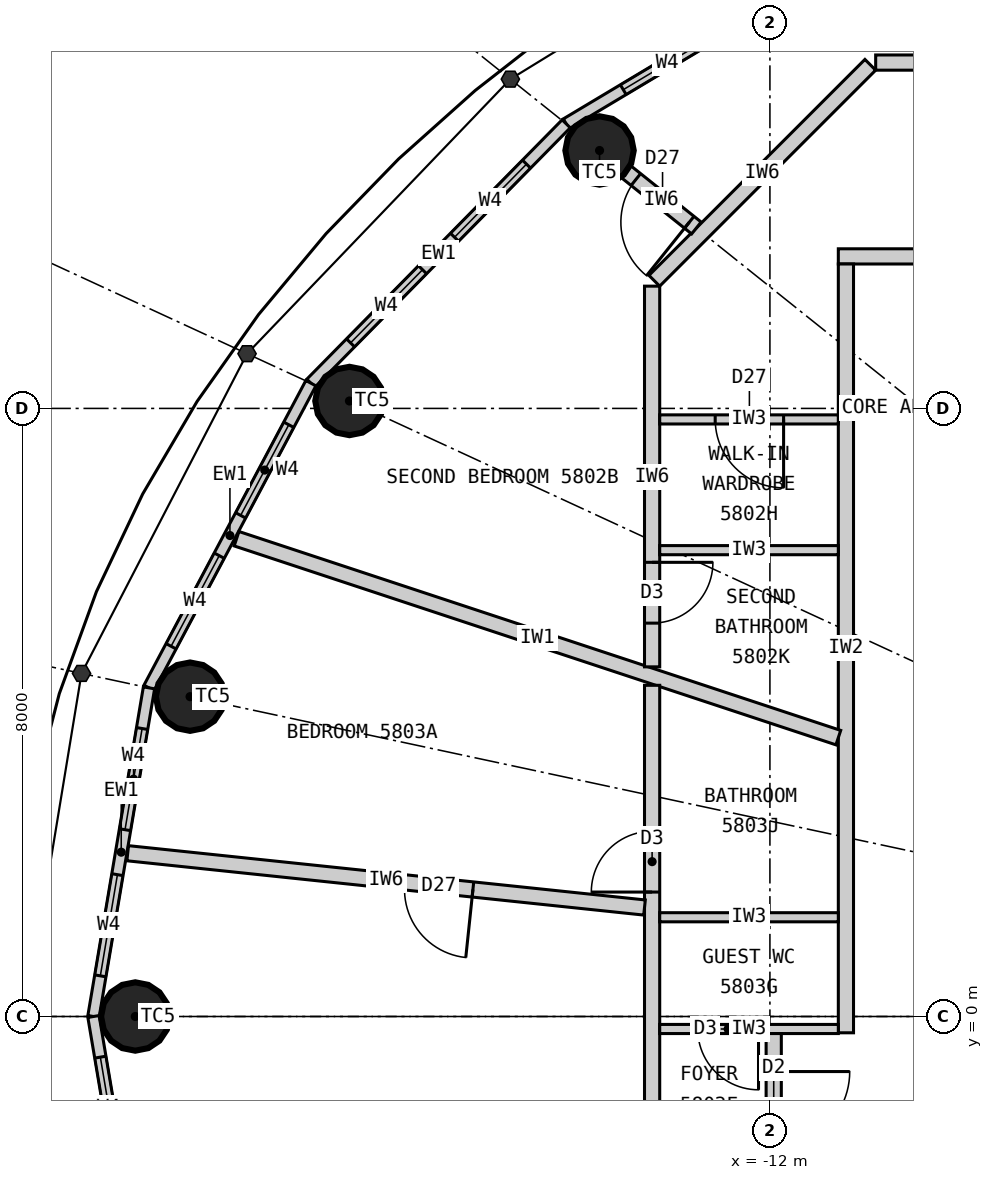
"""IFC4 building model, lengths in metres.
Left out: names, types, materials, properties, quantities, classifications, styles, units other than length and angle.
Written with IfcOpenShell. Run it as: python <this file> out.ifc"""

import sys

from ifc_helpers import new_model, si_unit, direction, frame, frame_2d, origin, origin_2d, place, context, subcontext, project, spatial, rectangle, circle, extrude, element, fill, save


model = new_model("IFC4")
c1 = context("Model", 3, precision=1e-05, world=origin(), true_north=direction((0.0, 1.0)))
c2 = subcontext(c1, "Body", "Model", "MODEL_VIEW")
j1 = project(units=[si_unit("LENGTHUNIT", "METRE"), si_unit("PLANEANGLEUNIT", "RADIAN")], contexts=[c1])
p1 = place(None, origin())
s1 = spatial("IfcSite", under=j1, at=p1, CompositionType="ELEMENT")
p2 = place(p1, origin())
s2 = spatial("IfcBuilding", under=s1, at=p2, CompositionType="ELEMENT")
p3 = place(p2, frame((0.0, 0.0, 216.0)))
s3 = spatial("IfcBuildingStorey", under=s2, at=p3, CompositionType="ELEMENT", Elevation=216.0)
for number, where, z_axis, x_axis in (
    (1, (-14.241, 11.393, 0.0), (0.0, 0.0, 1.0), (1.0, 0.0, 0.0)),
    (2, (-17.532, 8.098, 0.0), (0.0, 0.0, 1.0), (1.0, 0.0, 0.0)),
    (3, (-19.629, 4.208, 0.0), (0.0, 0.0, 1.0), (1.0, 0.0, 0.0)),
    (4, (-20.35, 0.0, 0.0), (0.0, 0.0, 1.0), (1.0, 0.0, 0.0)),
):
    element("IfcColumn", number, at=place(p3, frame(where, z_axis=z_axis, x_axis=x_axis)), inside=s3, PredefinedType="COLUMN", context=c2, shape_type="SweptSolid", body=[
        extrude(circle(Radius=0.45, at=origin_2d()), origin(), (0.0, 0.0, 1.0), 3.3),
    ])
p4 = place(p3, frame((-10.346, 14.336, 0.0), z_axis=(0.0, 0.0, 1.0), x_axis=(-0.85822150553, -0.513279502265, 0.0)))
e5 = element("IfcWall", 5, at=p4, inside=s3, PredefinedType="ELEMENTEDWALL", context=c2, shape_type="SweptSolid", body=[
    extrude(rectangle(XDim=5.05, YDim=0.15, at=frame_2d((2.525, 0.0))), origin(), (0.0, 0.0, 1.0), 3.12),
])
p5 = place(p4, frame((0.875, 0.0, 0.9)))
e6 = element("IfcOpeningElement", 6, at=p5, cuts=e5, PredefinedType="OPENING", context=c2, shape_type="SweptSolid", body=[
    extrude(rectangle(XDim=1.35, YDim=1.9, at=frame_2d((0.675, 0.95))), frame((0.0, 0.085, 0.0), z_axis=(0.0, -1.0, 0.0), x_axis=(1.0, 0.0, 0.0)), (0.0, 0.0, 1.0), 0.17),
])
p6 = place(p4, frame((2.825, 0.0, 0.9)))
e7 = element("IfcOpeningElement", 7, at=p6, cuts=e5, PredefinedType="OPENING", context=c2, shape_type="SweptSolid", body=[
    extrude(rectangle(XDim=1.35, YDim=1.9, at=frame_2d((0.675, 0.95))), frame((0.0, 0.085, 0.0), z_axis=(0.0, -1.0, 0.0), x_axis=(1.0, 0.0, 0.0)), (0.0, 0.0, 1.0), 0.17),
])
p7 = place(p3, frame((-14.68, 11.744, 0.0), z_axis=(0.0, 0.0, 1.0), x_axis=(-0.701527379618, -0.712642501993, 0.0)))
e8 = element("IfcWall", 8, at=p7, inside=s3, PredefinedType="ELEMENTEDWALL", context=c2, shape_type="SweptSolid", body=[
    extrude(rectangle(XDim=4.788, YDim=0.15, at=frame_2d((2.394, 0.0))), origin(), (0.0, 0.0, 1.0), 3.12),
])
p8 = place(p7, frame((0.744, 0.0, 0.9)))
e9 = element("IfcOpeningElement", 9, at=p8, cuts=e8, PredefinedType="OPENING", context=c2, shape_type="SweptSolid", body=[
    extrude(rectangle(XDim=1.35, YDim=1.9, at=frame_2d((0.675, 0.95))), frame((0.0, 0.085, 0.0), z_axis=(0.0, -1.0, 0.0), x_axis=(1.0, 0.0, 0.0)), (0.0, 0.0, 1.0), 0.17),
])
p9 = place(p7, frame((2.694, 0.0, 0.9)))
e10 = element("IfcOpeningElement", 10, at=p9, cuts=e8, PredefinedType="OPENING", context=c2, shape_type="SweptSolid", body=[
    extrude(rectangle(XDim=1.35, YDim=1.9, at=frame_2d((0.675, 0.95))), frame((0.0, 0.085, 0.0), z_axis=(0.0, -1.0, 0.0), x_axis=(1.0, 0.0, 0.0)), (0.0, 0.0, 1.0), 0.17),
])
p10 = place(p3, frame((-18.04, 8.332, 0.0), z_axis=(0.0, 0.0, 1.0), x_axis=(-0.469256152955, -0.883062094597, 0.0)))
e11 = element("IfcWall", 11, at=p10, inside=s3, PredefinedType="ELEMENTEDWALL", context=c2, shape_type="SweptSolid", body=[
    extrude(rectangle(XDim=4.539, YDim=0.15, at=frame_2d((2.27, 0.0))), origin(), (0.0, 0.0, 1.0), 3.12),
])
p11 = place(p10, frame((0.62, 0.0, 0.9)))
e12 = element("IfcOpeningElement", 12, at=p11, cuts=e11, PredefinedType="OPENING", context=c2, shape_type="SweptSolid", body=[
    extrude(rectangle(XDim=1.35, YDim=1.9, at=frame_2d((0.675, 0.95))), frame((0.0, 0.085, 0.0), z_axis=(0.0, -1.0, 0.0), x_axis=(1.0, 0.0, 0.0)), (0.0, 0.0, 1.0), 0.17),
])
p12 = place(p10, frame((2.57, 0.0, 0.9)))
e13 = element("IfcOpeningElement", 13, at=p12, cuts=e11, PredefinedType="OPENING", context=c2, shape_type="SweptSolid", body=[
    extrude(rectangle(XDim=1.35, YDim=1.9, at=frame_2d((0.675, 0.95))), frame((0.0, 0.085, 0.0), z_axis=(0.0, -1.0, 0.0), x_axis=(1.0, 0.0, 0.0)), (0.0, 0.0, 1.0), 0.17),
])
p13 = place(p3, frame((-20.17, 4.323, 0.0), z_axis=(0.0, 0.0, 1.0), x_axis=(-0.166538513568, -0.986034950445, 0.0)))
e14 = element("IfcWall", 14, at=p13, inside=s3, PredefinedType="ELEMENTEDWALL", context=c2, shape_type="SweptSolid", body=[
    extrude(rectangle(XDim=4.385, YDim=0.15, at=frame_2d((2.192, 0.0))), origin(), (0.0, 0.0, 1.0), 3.12),
])
p14 = place(p13, frame((0.542, 0.0, 0.9)))
e15 = element("IfcOpeningElement", 15, at=p14, cuts=e14, PredefinedType="OPENING", context=c2, shape_type="SweptSolid", body=[
    extrude(rectangle(XDim=1.35, YDim=1.9, at=frame_2d((0.675, 0.95))), frame((0.0, 0.085, 0.0), z_axis=(0.0, -1.0, 0.0), x_axis=(1.0, 0.0, 0.0)), (0.0, 0.0, 1.0), 0.17),
])
p15 = place(p13, frame((2.492, 0.0, 0.9)))
e16 = element("IfcOpeningElement", 16, at=p15, cuts=e14, PredefinedType="OPENING", context=c2, shape_type="SweptSolid", body=[
    extrude(rectangle(XDim=1.35, YDim=1.9, at=frame_2d((0.675, 0.95))), frame((0.0, 0.085, 0.0), z_axis=(0.0, -1.0, 0.0), x_axis=(1.0, 0.0, 0.0)), (0.0, 0.0, 1.0), 0.17),
])
p16 = place(p3, frame((-20.9, 0.0, 0.0), z_axis=(0.0, 0.0, 1.0), x_axis=(0.166538513568, -0.986034950445, 0.0)))
e17 = element("IfcWall", 17, at=p16, inside=s3, PredefinedType="ELEMENTEDWALL", context=c2, shape_type="SweptSolid", body=[
    extrude(rectangle(XDim=4.385, YDim=0.15, at=frame_2d((2.192, 0.0))), origin(), (0.0, 0.0, 1.0), 3.12),
])
p17 = place(p16, frame((0.542, 0.0, 0.9)))
e18 = element("IfcOpeningElement", 18, at=p17, cuts=e17, PredefinedType="OPENING", context=c2, shape_type="SweptSolid", body=[
    extrude(rectangle(XDim=1.35, YDim=1.9, at=frame_2d((0.675, 0.95))), frame((0.0, 0.085, 0.0), z_axis=(0.0, -1.0, 0.0), x_axis=(1.0, 0.0, 0.0)), (0.0, 0.0, 1.0), 0.17),
])
p18 = place(p16, frame((2.492, 0.0, 0.9)))
e19 = element("IfcOpeningElement", 19, at=p18, cuts=e17, PredefinedType="OPENING", context=c2, shape_type="SweptSolid", body=[
    extrude(rectangle(XDim=1.35, YDim=1.9, at=frame_2d((0.675, 0.95))), frame((0.0, 0.085, 0.0), z_axis=(0.0, -1.0, 0.0), x_axis=(1.0, 0.0, 0.0)), (0.0, 0.0, 1.0), 0.17),
])
p19 = place(p3, frame((-11.1, 10.0, 0.0), z_axis=(0.0, 0.0, 1.0), x_axis=(1.0, 0.0, 0.0)))
e20 = element("IfcWall", 20, at=p19, inside=s3, PredefinedType="PARTITIONING", context=c2, shape_type="SweptSolid", body=[
    extrude(rectangle(XDim=22.2, YDim=0.2, at=frame_2d((11.1, 0.0))), origin(), (0.0, 0.0, 1.0), 3.12),
])
p20 = place(p19, frame((20.9, 0.0, 0.0)))
e21 = element("IfcOpeningElement", 21, at=p20, cuts=e20, PredefinedType="OPENING", context=c2, shape_type="SweptSolid", body=[
    extrude(rectangle(XDim=1.0, YDim=2.2, at=frame_2d((0.5, 1.1))), frame((0.0, 0.11, 0.0), z_axis=(0.0, -1.0, 0.0), x_axis=(1.0, 0.0, 0.0)), (0.0, 0.0, 1.0), 0.22),
])
p21 = place(p19, frame((2.82, 0.0, 0.0)))
e22 = element("IfcOpeningElement", 22, at=p21, cuts=e20, PredefinedType="OPENING", context=c2, shape_type="SweptSolid", body=[
    extrude(rectangle(XDim=1.0, YDim=2.2, at=frame_2d((0.5, 1.1))), frame((0.0, 0.11, 0.0), z_axis=(0.0, -1.0, 0.0), x_axis=(1.0, 0.0, 0.0)), (0.0, 0.0, 1.0), 0.22),
])
p22 = place(p3, frame((-11.0, 9.9, 0.0), z_axis=(0.0, 0.0, 1.0), x_axis=(0.0, -1.0, 0.0)))
e23 = element("IfcWall", 23, at=p22, inside=s3, PredefinedType="PARTITIONING", context=c2, shape_type="SweptSolid", body=[
    extrude(rectangle(XDim=10.114, YDim=0.2, at=frame_2d((5.057, 0.0))), origin(), (0.0, 0.0, 1.0), 3.12),
])
p23 = place(p3, frame((-11.1, 3.669, 0.0), z_axis=(0.0, 0.0, 1.0), x_axis=(-0.949476668397, 0.313837627079, 0.0)))
e24 = element("IfcWall", 24, at=p23, inside=s3, PredefinedType="PARTITIONING", context=c2, shape_type="SweptSolid", body=[
    extrude(rectangle(XDim=8.339, YDim=0.2, at=frame_2d((4.169, 0.0))), origin(), (0.0, 0.0, 1.0), 3.12),
])
p24 = place(p3, frame((1.968, 12.55, 0.0), z_axis=(0.0, 0.0, 1.0), x_axis=(-1.0, 0.0, 0.0)))
e25 = element("IfcWall", 25, at=p24, inside=s3, PredefinedType="PARTITIONING", context=c2, shape_type="SweptSolid", body=[
    extrude(rectangle(XDim=12.576, YDim=0.2, at=frame_2d((6.288, 0.0))), origin(), (0.0, 0.0, 1.0), 3.12),
])
p25 = place(p24, frame((1.708, 0.0, 0.0)))
e26 = element("IfcOpeningElement", 26, at=p25, cuts=e25, PredefinedType="OPENING", context=c2, shape_type="SweptSolid", body=[
    extrude(rectangle(XDim=0.8, YDim=2.1, at=frame_2d((0.4, 1.05))), frame((0.0, 0.11, 0.0), z_axis=(0.0, -1.0, 0.0), x_axis=(1.0, 0.0, 0.0)), (0.0, 0.0, 1.0), 0.22),
])
p26 = place(p24, frame((6.62, 0.0, 0.0)))
e27 = element("IfcOpeningElement", 27, at=p26, cuts=e25, PredefinedType="OPENING", context=c2, shape_type="SweptSolid", body=[
    extrude(rectangle(XDim=0.9, YDim=2.1, at=frame_2d((0.45, 1.05))), frame((0.0, 0.11, 0.0), z_axis=(0.0, -1.0, 0.0), x_axis=(1.0, 0.0, 0.0)), (0.0, 0.0, 1.0), 0.22),
])
p27 = place(p3, frame((-10.679, 12.521, 0.0), z_axis=(0.0, 0.0, 1.0), x_axis=(-0.707106781187, -0.707106781187, 0.0)))
e28 = element("IfcWall", 28, at=p27, inside=s3, PredefinedType="PARTITIONING", context=c2, shape_type="SweptSolid", body=[
    extrude(rectangle(XDim=4.019, YDim=0.2, at=frame_2d((2.009, 0.0))), origin(), (0.0, 0.0, 1.0), 3.12),
])
p28 = place(p3, frame((-13.55, 9.609, 0.0), z_axis=(0.0, 0.0, 1.0), x_axis=(0.0, -1.0, 0.0)))
e29 = element("IfcWall", 29, at=p28, inside=s3, PredefinedType="PARTITIONING", context=c2, shape_type="SweptSolid", body=[
    extrude(rectangle(XDim=5.009, YDim=0.2, at=frame_2d((2.504, 0.0))), origin(), (0.0, 0.0, 1.0), 3.12),
])
p29 = place(p28, frame((3.633, 0.0, 0.0)))
e30 = element("IfcOpeningElement", 30, at=p29, cuts=e29, PredefinedType="OPENING", context=c2, shape_type="SweptSolid", body=[
    extrude(rectangle(XDim=0.8, YDim=2.1, at=frame_2d((0.4, 1.05))), frame((0.0, 0.11, 0.0), z_axis=(0.0, -1.0, 0.0), x_axis=(1.0, 0.0, 0.0)), (0.0, 0.0, 1.0), 0.22),
])
p30 = place(p3, frame((-12.968, 10.374, 0.0), z_axis=(0.0, 0.0, 1.0), x_axis=(-0.780888968944, 0.624669847345, 0.0)))
e31 = element("IfcWall", 31, at=p30, inside=s3, PredefinedType="PARTITIONING", context=c2, shape_type="SweptSolid", body=[
    extrude(rectangle(XDim=1.181, YDim=0.2, at=frame_2d((0.591, 0.0))), origin(), (0.0, 0.0, 1.0), 2.42),
])
p31 = place(p30, frame((0.12, 0.0, 0.0)))
e32 = element("IfcOpeningElement", 32, at=p31, cuts=e31, PredefinedType="OPENING", context=c2, shape_type="SweptSolid", body=[
    extrude(rectangle(XDim=0.9, YDim=2.1, at=frame_2d((0.45, 1.05))), frame((0.0, 0.11, 0.0), z_axis=(0.0, -1.0, 0.0), x_axis=(1.0, 0.0, 0.0)), (0.0, 0.0, 1.0), 0.22),
])
p32 = place(p3, frame((-11.1, 7.855, 0.0), z_axis=(0.0, 0.0, 1.0), x_axis=(-1.0, 0.0, 0.0)))
e33 = element("IfcWall", 33, at=p32, inside=s3, PredefinedType="PARTITIONING", context=c2, shape_type="SweptSolid", body=[
    extrude(rectangle(XDim=2.35, YDim=0.12, at=frame_2d((1.175, 0.0))), origin(), (0.0, 0.0, 1.0), 3.12),
])
p33 = place(p32, frame((0.72, 0.0, 0.0)))
e34 = element("IfcOpeningElement", 34, at=p33, cuts=e33, PredefinedType="OPENING", context=c2, shape_type="SweptSolid", body=[
    extrude(rectangle(XDim=0.9, YDim=2.1, at=frame_2d((0.45, 1.05))), frame((0.0, 0.07, 0.0), z_axis=(0.0, -1.0, 0.0), x_axis=(1.0, 0.0, 0.0)), (0.0, 0.0, 1.0), 0.14),
])
p34 = place(p3, frame((-11.1, 6.135, 0.0), z_axis=(0.0, 0.0, 1.0), x_axis=(-1.0, 0.0, 0.0)))
e35 = element("IfcWall", 35, at=p34, inside=s3, PredefinedType="PARTITIONING", context=c2, shape_type="SweptSolid", body=[
    extrude(rectangle(XDim=2.35, YDim=0.12, at=frame_2d((1.175, 0.0))), origin(), (0.0, 0.0, 1.0), 3.12),
])
p35 = place(p3, frame((-13.55, 4.357, 0.0), z_axis=(0.0, 0.0, 1.0), x_axis=(0.0, -1.0, 0.0)))
e36 = element("IfcWall", 36, at=p35, inside=s3, PredefinedType="PARTITIONING", context=c2, shape_type="SweptSolid", body=[
    extrude(rectangle(XDim=12.496, YDim=0.2, at=frame_2d((6.248, 0.0))), origin(), (0.0, 0.0, 1.0), 3.12),
])
p36 = place(p35, frame((1.92, 0.0, 0.0)))
e37 = element("IfcOpeningElement", 37, at=p36, cuts=e36, PredefinedType="OPENING", context=c2, shape_type="SweptSolid", body=[
    extrude(rectangle(XDim=0.8, YDim=2.1, at=frame_2d((0.4, 1.05))), frame((0.0, 0.11, 0.0), z_axis=(0.0, -1.0, 0.0), x_axis=(1.0, 0.0, 0.0)), (0.0, 0.0, 1.0), 0.22),
])
p37 = place(p35, frame((9.27, 0.0, 0.0)))
e38 = element("IfcOpeningElement", 38, at=p37, cuts=e36, PredefinedType="OPENING", context=c2, shape_type="SweptSolid", body=[
    extrude(rectangle(XDim=0.8, YDim=2.1, at=frame_2d((0.4, 1.05))), frame((0.0, 0.11, 0.0), z_axis=(0.0, -1.0, 0.0), x_axis=(1.0, 0.0, 0.0)), (0.0, 0.0, 1.0), 0.22),
])
p38 = place(p35, frame((5.557, 0.0, 0.0)))
e39 = element("IfcOpeningElement", 39, at=p38, cuts=e36, PredefinedType="OPENING", context=c2, shape_type="SweptSolid", body=[
    extrude(rectangle(XDim=0.9, YDim=2.1, at=frame_2d((0.45, 1.05))), frame((0.0, 0.11, 0.0), z_axis=(0.0, -1.0, 0.0), x_axis=(1.0, 0.0, 0.0)), (0.0, 0.0, 1.0), 0.22),
])
p39 = place(p3, frame((-13.65, 1.434, 0.0), z_axis=(0.0, 0.0, 1.0), x_axis=(-0.994526954268, 0.10448031984, 0.0)))
e40 = element("IfcWall", 40, at=p39, inside=s3, PredefinedType="PARTITIONING", context=c2, shape_type="SweptSolid", body=[
    extrude(rectangle(XDim=6.837, YDim=0.2, at=frame_2d((3.418, 0.0))), origin(), (0.0, 0.0, 1.0), 2.47),
])
p40 = place(p39, frame((2.27, 0.0, 0.0)))
e41 = element("IfcOpeningElement", 41, at=p40, cuts=e40, PredefinedType="OPENING", context=c2, shape_type="SweptSolid", body=[
    extrude(rectangle(XDim=0.9, YDim=2.1, at=frame_2d((0.45, 1.05))), frame((0.0, 0.11, 0.0), z_axis=(0.0, -1.0, 0.0), x_axis=(1.0, 0.0, 0.0)), (0.0, 0.0, 1.0), 0.22),
])
p41 = place(p3, frame((-11.1, 1.306, 0.0), z_axis=(0.0, 0.0, 1.0), x_axis=(-1.0, 0.0, 0.0)))
e42 = element("IfcWall", 42, at=p41, inside=s3, PredefinedType="PARTITIONING", context=c2, shape_type="SweptSolid", body=[
    extrude(rectangle(XDim=2.35, YDim=0.12, at=frame_2d((1.175, 0.0))), origin(), (0.0, 0.0, 1.0), 3.12),
])
p42 = place(p3, frame((-11.1, -0.164, 0.0), z_axis=(0.0, 0.0, 1.0), x_axis=(-1.0, 0.0, 0.0)))
e43 = element("IfcWall", 43, at=p42, inside=s3, PredefinedType="PARTITIONING", context=c2, shape_type="SweptSolid", body=[
    extrude(rectangle(XDim=2.35, YDim=0.12, at=frame_2d((1.175, 0.0))), origin(), (0.0, 0.0, 1.0), 3.12),
])
p43 = place(p42, frame((1.05, 0.0, 0.0)))
e44 = element("IfcOpeningElement", 44, at=p43, cuts=e43, PredefinedType="OPENING", context=c2, shape_type="SweptSolid", body=[
    extrude(rectangle(XDim=0.8, YDim=2.1, at=frame_2d((0.4, 1.05))), frame((0.0, 0.07, 0.0), z_axis=(0.0, -1.0, 0.0), x_axis=(1.0, 0.0, 0.0)), (0.0, 0.0, 1.0), 0.14),
])
p44 = place(p3, frame((-11.95, -0.224, 0.0), z_axis=(0.0, 0.0, 1.0), x_axis=(0.0, -1.0, 0.0)))
e45 = element("IfcWall", 45, at=p44, inside=s3, PredefinedType="PARTITIONING", context=c2, shape_type="SweptSolid", body=[
    extrude(rectangle(XDim=2.0, YDim=0.2, at=frame_2d((1.0, 0.0))), origin(), (0.0, 0.0, 1.0), 3.12),
])
p45 = place(p44, frame((0.5, 0.0, 0.0)))
e46 = element("IfcOpeningElement", 46, at=p45, cuts=e45, PredefinedType="OPENING", context=c2, shape_type="SweptSolid", body=[
    extrude(rectangle(XDim=1.0, YDim=2.2, at=frame_2d((0.5, 1.1))), frame((0.0, 0.11, 0.0), z_axis=(0.0, -1.0, 0.0), x_axis=(1.0, 0.0, 0.0)), (0.0, 0.0, 1.0), 0.22),
])
p46 = place(p6, origin())
e47 = element("IfcWindow", 47, at=p46, inside=s3, PartitioningType="SINGLE_PANEL", PredefinedType="WINDOW", context=c2, shape_type="SweptSolid", body=[
    extrude(rectangle(XDim=1.35, YDim=1.9, at=frame_2d((0.675, 0.95))), frame((0.0, 0.03, 0.0), z_axis=(0.0, -1.0, 0.0), x_axis=(1.0, 0.0, 0.0)), (0.0, 0.0, 1.0), 0.06),
])
fill(e7, e47)
p47 = place(p8, origin())
e48 = element("IfcWindow", 48, at=p47, inside=s3, PartitioningType="SINGLE_PANEL", PredefinedType="WINDOW", context=c2, shape_type="SweptSolid", body=[
    extrude(rectangle(XDim=1.35, YDim=1.9, at=frame_2d((0.675, 0.95))), frame((0.0, 0.03, 0.0), z_axis=(0.0, -1.0, 0.0), x_axis=(1.0, 0.0, 0.0)), (0.0, 0.0, 1.0), 0.06),
])
fill(e9, e48)
p48 = place(p9, origin())
e49 = element("IfcWindow", 49, at=p48, inside=s3, PartitioningType="SINGLE_PANEL", PredefinedType="WINDOW", context=c2, shape_type="SweptSolid", body=[
    extrude(rectangle(XDim=1.35, YDim=1.9, at=frame_2d((0.675, 0.95))), frame((0.0, 0.03, 0.0), z_axis=(0.0, -1.0, 0.0), x_axis=(1.0, 0.0, 0.0)), (0.0, 0.0, 1.0), 0.06),
])
fill(e10, e49)
p49 = place(p11, origin())
e50 = element("IfcWindow", 50, at=p49, inside=s3, PartitioningType="SINGLE_PANEL", PredefinedType="WINDOW", context=c2, shape_type="SweptSolid", body=[
    extrude(rectangle(XDim=1.35, YDim=1.9, at=frame_2d((0.675, 0.95))), frame((0.0, 0.03, 0.0), z_axis=(0.0, -1.0, 0.0), x_axis=(1.0, 0.0, 0.0)), (0.0, 0.0, 1.0), 0.06),
])
fill(e12, e50)
p50 = place(p12, origin())
e51 = element("IfcWindow", 51, at=p50, inside=s3, PartitioningType="SINGLE_PANEL", PredefinedType="WINDOW", context=c2, shape_type="SweptSolid", body=[
    extrude(rectangle(XDim=1.35, YDim=1.9, at=frame_2d((0.675, 0.95))), frame((0.0, 0.03, 0.0), z_axis=(0.0, -1.0, 0.0), x_axis=(1.0, 0.0, 0.0)), (0.0, 0.0, 1.0), 0.06),
])
fill(e13, e51)
p51 = place(p14, origin())
e52 = element("IfcWindow", 52, at=p51, inside=s3, PartitioningType="SINGLE_PANEL", PredefinedType="WINDOW", context=c2, shape_type="SweptSolid", body=[
    extrude(rectangle(XDim=1.35, YDim=1.9, at=frame_2d((0.675, 0.95))), frame((0.0, 0.03, 0.0), z_axis=(0.0, -1.0, 0.0), x_axis=(1.0, 0.0, 0.0)), (0.0, 0.0, 1.0), 0.06),
])
fill(e15, e52)
p52 = place(p15, origin())
e53 = element("IfcWindow", 53, at=p52, inside=s3, PartitioningType="SINGLE_PANEL", PredefinedType="WINDOW", context=c2, shape_type="SweptSolid", body=[
    extrude(rectangle(XDim=1.35, YDim=1.9, at=frame_2d((0.675, 0.95))), frame((0.0, 0.03, 0.0), z_axis=(0.0, -1.0, 0.0), x_axis=(1.0, 0.0, 0.0)), (0.0, 0.0, 1.0), 0.06),
])
fill(e16, e53)
p53 = place(p17, origin())
e54 = element("IfcWindow", 54, at=p53, inside=s3, PartitioningType="SINGLE_PANEL", PredefinedType="WINDOW", context=c2, shape_type="SweptSolid", body=[
    extrude(rectangle(XDim=1.35, YDim=1.9, at=frame_2d((0.675, 0.95))), frame((0.0, 0.03, 0.0), z_axis=(0.0, -1.0, 0.0), x_axis=(1.0, 0.0, 0.0)), (0.0, 0.0, 1.0), 0.06),
])
fill(e18, e54)
p54 = place(p33, origin())
e55 = element("IfcDoor", 55, at=p54, inside=s3, OperationType="SINGLE_SWING_LEFT", PredefinedType="DOOR", context=c2, shape_type="SweptSolid", body=[
    extrude(rectangle(XDim=0.9, YDim=2.1, at=frame_2d((0.45, 1.05))), frame((0.0, 0.025, 0.0), z_axis=(0.0, -1.0, 0.0), x_axis=(1.0, 0.0, 0.0)), (0.0, 0.0, 1.0), 0.05),
])
fill(e34, e55)
p55 = place(p29, origin())
e56 = element("IfcDoor", 56, at=p55, inside=s3, OperationType="SINGLE_SWING_LEFT", PredefinedType="DOOR", context=c2, shape_type="SweptSolid", body=[
    extrude(rectangle(XDim=0.8, YDim=2.1, at=frame_2d((0.4, 1.05))), frame((0.0, 0.025, 0.0), z_axis=(0.0, -1.0, 0.0), x_axis=(1.0, 0.0, 0.0)), (0.0, 0.0, 1.0), 0.05),
])
fill(e30, e56)
p56 = place(p31, origin())
e57 = element("IfcDoor", 57, at=p56, inside=s3, OperationType="SINGLE_SWING_LEFT", PredefinedType="DOOR", context=c2, shape_type="SweptSolid", body=[
    extrude(rectangle(XDim=0.9, YDim=2.1, at=frame_2d((0.45, 1.05))), frame((0.0, 0.025, 0.0), z_axis=(0.0, -1.0, 0.0), x_axis=(1.0, 0.0, 0.0)), (0.0, 0.0, 1.0), 0.05),
])
fill(e32, e57)
p57 = place(p45, origin())
e58 = element("IfcDoor", 58, at=p57, inside=s3, OperationType="SINGLE_SWING_LEFT", PredefinedType="DOOR", context=c2, shape_type="SweptSolid", body=[
    extrude(rectangle(XDim=1.0, YDim=2.2, at=frame_2d((0.5, 1.1))), frame((0.0, 0.025, 0.0), z_axis=(0.0, -1.0, 0.0), x_axis=(1.0, 0.0, 0.0)), (0.0, 0.0, 1.0), 0.05),
])
fill(e46, e58)
p58 = place(p36, origin())
e59 = element("IfcDoor", 59, at=p58, inside=s3, OperationType="SINGLE_SWING_RIGHT", PredefinedType="DOOR", context=c2, shape_type="SweptSolid", body=[
    extrude(rectangle(XDim=0.8, YDim=2.1, at=frame_2d((0.4, 1.05))), frame((0.0, 0.025, 0.0), z_axis=(0.0, -1.0, 0.0), x_axis=(1.0, 0.0, 0.0)), (0.0, 0.0, 1.0), 0.05),
])
fill(e37, e59)
p59 = place(p43, origin())
e60 = element("IfcDoor", 60, at=p59, inside=s3, OperationType="SINGLE_SWING_LEFT", PredefinedType="DOOR", context=c2, shape_type="SweptSolid", body=[
    extrude(rectangle(XDim=0.8, YDim=2.1, at=frame_2d((0.4, 1.05))), frame((0.0, 0.025, 0.0), z_axis=(0.0, -1.0, 0.0), x_axis=(1.0, 0.0, 0.0)), (0.0, 0.0, 1.0), 0.05),
])
fill(e44, e60)
p60 = place(p40, origin())
e61 = element("IfcDoor", 61, at=p60, inside=s3, OperationType="SINGLE_SWING_LEFT", PredefinedType="DOOR", context=c2, shape_type="SweptSolid", body=[
    extrude(rectangle(XDim=0.9, YDim=2.1, at=frame_2d((0.45, 1.05))), frame((0.0, 0.025, 0.0), z_axis=(0.0, -1.0, 0.0), x_axis=(1.0, 0.0, 0.0)), (0.0, 0.0, 1.0), 0.05),
])
fill(e41, e61)
save(model, sys.argv[1])
